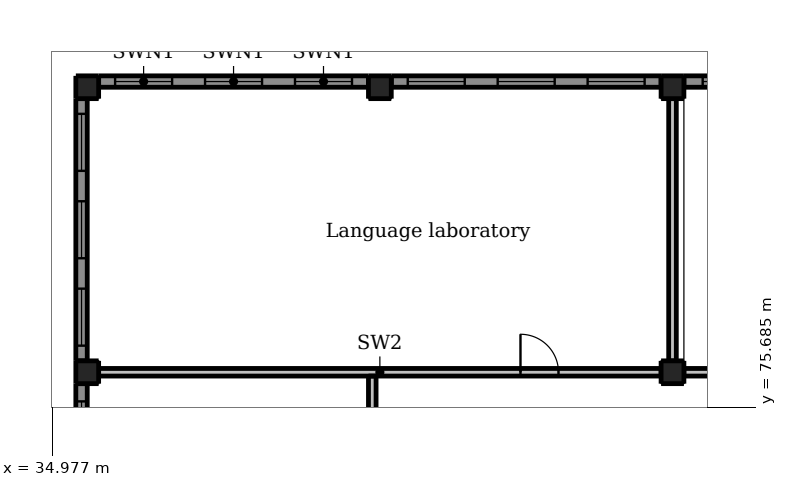
"""IFC4 building model, lengths in metres.
Left out: names, types, materials, properties, quantities, classifications, styles, units other than length and angle.
Written with IfcOpenShell. Run it as: python <this file> out.ifc"""

import sys

from ifc_helpers import new_model, si_unit, direction, frame, frame_2d, origin, origin_2d, place, context, subcontext, project, spatial, rectangle, extrude, element, fill, save


model = new_model("IFC4")
c1 = context("Model", 3, precision=1e-05, world=origin(), true_north=direction((0.0, 1.0)))
c2 = subcontext(c1, "Body", "Model", "MODEL_VIEW")
j1 = project(units=[si_unit("LENGTHUNIT", "METRE"), si_unit("PLANEANGLEUNIT", "RADIAN")], contexts=[c1])
p1 = place(None, origin())
s1 = spatial("IfcSite", under=j1, at=p1, CompositionType="ELEMENT")
p2 = place(p1, origin())
s2 = spatial("IfcBuilding", under=s1, at=p2, CompositionType="ELEMENT")
p3 = place(p2, frame((0.0, 0.0, 19.0)))
s3 = spatial("IfcBuildingStorey", under=s2, at=p3, CompositionType="ELEMENT", Elevation=19.0)
for number, where, z_axis, x_axis in (
    (1, (35.9, 76.6, -0.3), (0.0, 0.0, 1.0), (1.0, 0.0, 0.0)),
    (2, (51.3, 76.6, -0.3), (0.0, 0.0, 1.0), (1.0, 0.0, 0.0)),
    (3, (35.9, 84.1, -0.3), (0.0, 0.0, 1.0), (1.0, 0.0, 0.0)),
    (4, (51.3, 84.1, -0.3), (0.0, 0.0, 1.0), (1.0, 0.0, 0.0)),
    (5, (43.6, 84.1, -0.3), (0.0, 0.0, 1.0), (1.0, 0.0, 0.0)),
):
    element("IfcColumn", number, at=place(p3, frame(where, z_axis=z_axis, x_axis=x_axis)), inside=s3, PredefinedType="COLUMN", context=c2, shape_type="SweptSolid", body=[
        extrude(rectangle(XDim=0.6, YDim=0.6, at=origin_2d()), origin(), (0.0, 0.0, 1.0), 4.35),
    ])
p4 = place(p3, frame((35.75, 69.0, 0.0), z_axis=(0.0, 0.0, 1.0), x_axis=(0.0, 1.0, 0.0)))
e6 = element("IfcWall", 6, at=p4, inside=s3, PredefinedType="SOLIDWALL", context=c2, shape_type="SweptSolid", body=[
    extrude(rectangle(XDim=7.3, YDim=0.3, at=frame_2d((3.65, 0.0))), origin(), (0.0, 0.0, 1.0), 3.15),
])
p5 = place(p4, frame((0.467, 0.0, 0.9)))
e7 = element("IfcOpeningElement", 7, at=p5, cuts=e6, PredefinedType="OPENING", context=c2, shape_type="SweptSolid", body=[
    extrude(rectangle(XDim=1.5, YDim=1.5, at=frame_2d((0.75, 0.75))), frame((0.0, 0.16, 0.0), z_axis=(0.0, -1.0, 0.0), x_axis=(1.0, 0.0, 0.0)), (0.0, 0.0, 1.0), 0.32),
])
p6 = place(p4, frame((2.9, 0.0, 0.9)))
e8 = element("IfcOpeningElement", 8, at=p6, cuts=e6, PredefinedType="OPENING", context=c2, shape_type="SweptSolid", body=[
    extrude(rectangle(XDim=1.5, YDim=1.5, at=frame_2d((0.75, 0.75))), frame((0.0, 0.16, 0.0), z_axis=(0.0, -1.0, 0.0), x_axis=(1.0, 0.0, 0.0)), (0.0, 0.0, 1.0), 0.32),
])
p7 = place(p4, frame((5.333, 0.0, 0.9)))
e9 = element("IfcOpeningElement", 9, at=p7, cuts=e6, PredefinedType="OPENING", context=c2, shape_type="SweptSolid", body=[
    extrude(rectangle(XDim=1.5, YDim=1.5, at=frame_2d((0.75, 0.75))), frame((0.0, 0.16, 0.0), z_axis=(0.0, -1.0, 0.0), x_axis=(1.0, 0.0, 0.0)), (0.0, 0.0, 1.0), 0.32),
])
p8 = place(p3, frame((35.75, 76.9, 0.0), z_axis=(0.0, 0.0, 1.0), x_axis=(0.0, 1.0, 0.0)))
e10 = element("IfcWall", 10, at=p8, inside=s3, PredefinedType="SOLIDWALL", context=c2, shape_type="SweptSolid", body=[
    extrude(rectangle(XDim=6.9, YDim=0.3, at=frame_2d((3.45, 0.0))), origin(), (0.0, 0.0, 1.0), 3.15),
])
p9 = place(p8, frame((0.4, 0.0, 0.9)))
e11 = element("IfcOpeningElement", 11, at=p9, cuts=e10, PredefinedType="OPENING", context=c2, shape_type="SweptSolid", body=[
    extrude(rectangle(XDim=1.5, YDim=1.5, at=frame_2d((0.75, 0.75))), frame((0.0, 0.16, 0.0), z_axis=(0.0, -1.0, 0.0), x_axis=(1.0, 0.0, 0.0)), (0.0, 0.0, 1.0), 0.32),
])
p10 = place(p8, frame((2.7, 0.0, 0.9)))
e12 = element("IfcOpeningElement", 12, at=p10, cuts=e10, PredefinedType="OPENING", context=c2, shape_type="SweptSolid", body=[
    extrude(rectangle(XDim=1.5, YDim=1.5, at=frame_2d((0.75, 0.75))), frame((0.0, 0.16, 0.0), z_axis=(0.0, -1.0, 0.0), x_axis=(1.0, 0.0, 0.0)), (0.0, 0.0, 1.0), 0.32),
])
p11 = place(p8, frame((5.0, 0.0, 0.9)))
e13 = element("IfcOpeningElement", 13, at=p11, cuts=e10, PredefinedType="OPENING", context=c2, shape_type="SweptSolid", body=[
    extrude(rectangle(XDim=1.5, YDim=1.5, at=frame_2d((0.75, 0.75))), frame((0.0, 0.16, 0.0), z_axis=(0.0, -1.0, 0.0), x_axis=(1.0, 0.0, 0.0)), (0.0, 0.0, 1.0), 0.32),
])
p12 = place(p3, frame((36.2, 84.25, 0.0), z_axis=(0.0, 0.0, 1.0), x_axis=(1.0, 0.0, 0.0)))
e14 = element("IfcWall", 14, at=p12, inside=s3, PredefinedType="SOLIDWALL", context=c2, shape_type="SweptSolid", body=[
    extrude(rectangle(XDim=7.1, YDim=0.3, at=frame_2d((3.55, 0.0))), origin(), (0.0, 0.0, 1.0), 3.15),
])
p13 = place(p12, frame((0.433, 0.0, 0.9)))
e15 = element("IfcOpeningElement", 15, at=p13, cuts=e14, PredefinedType="OPENING", context=c2, shape_type="SweptSolid", body=[
    extrude(rectangle(XDim=1.5, YDim=1.5, at=frame_2d((0.75, 0.75))), frame((0.0, 0.16, 0.0), z_axis=(0.0, -1.0, 0.0), x_axis=(1.0, 0.0, 0.0)), (0.0, 0.0, 1.0), 0.32),
])
p14 = place(p12, frame((2.8, 0.0, 0.9)))
e16 = element("IfcOpeningElement", 16, at=p14, cuts=e14, PredefinedType="OPENING", context=c2, shape_type="SweptSolid", body=[
    extrude(rectangle(XDim=1.5, YDim=1.5, at=frame_2d((0.75, 0.75))), frame((0.0, 0.16, 0.0), z_axis=(0.0, -1.0, 0.0), x_axis=(1.0, 0.0, 0.0)), (0.0, 0.0, 1.0), 0.32),
])
p15 = place(p12, frame((5.167, 0.0, 0.9)))
e17 = element("IfcOpeningElement", 17, at=p15, cuts=e14, PredefinedType="OPENING", context=c2, shape_type="SweptSolid", body=[
    extrude(rectangle(XDim=1.5, YDim=1.5, at=frame_2d((0.75, 0.75))), frame((0.0, 0.16, 0.0), z_axis=(0.0, -1.0, 0.0), x_axis=(1.0, 0.0, 0.0)), (0.0, 0.0, 1.0), 0.32),
])
p16 = place(p3, frame((43.9, 84.25, 0.0), z_axis=(0.0, 0.0, 1.0), x_axis=(1.0, 0.0, 0.0)))
e18 = element("IfcWall", 18, at=p16, inside=s3, PredefinedType="SOLIDWALL", context=c2, shape_type="SweptSolid", body=[
    extrude(rectangle(XDim=7.1, YDim=0.3, at=frame_2d((3.55, 0.0))), origin(), (0.0, 0.0, 1.0), 3.15),
])
p17 = place(p16, frame((0.433, 0.0, 0.9)))
e19 = element("IfcOpeningElement", 19, at=p17, cuts=e18, PredefinedType="OPENING", context=c2, shape_type="SweptSolid", body=[
    extrude(rectangle(XDim=1.5, YDim=1.5, at=frame_2d((0.75, 0.75))), frame((0.0, 0.16, 0.0), z_axis=(0.0, -1.0, 0.0), x_axis=(1.0, 0.0, 0.0)), (0.0, 0.0, 1.0), 0.32),
])
p18 = place(p16, frame((2.8, 0.0, 0.9)))
e20 = element("IfcOpeningElement", 20, at=p18, cuts=e18, PredefinedType="OPENING", context=c2, shape_type="SweptSolid", body=[
    extrude(rectangle(XDim=1.5, YDim=1.5, at=frame_2d((0.75, 0.75))), frame((0.0, 0.16, 0.0), z_axis=(0.0, -1.0, 0.0), x_axis=(1.0, 0.0, 0.0)), (0.0, 0.0, 1.0), 0.32),
])
p19 = place(p16, frame((5.167, 0.0, 0.9)))
e21 = element("IfcOpeningElement", 21, at=p19, cuts=e18, PredefinedType="OPENING", context=c2, shape_type="SweptSolid", body=[
    extrude(rectangle(XDim=1.5, YDim=1.5, at=frame_2d((0.75, 0.75))), frame((0.0, 0.16, 0.0), z_axis=(0.0, -1.0, 0.0), x_axis=(1.0, 0.0, 0.0)), (0.0, 0.0, 1.0), 0.32),
])
p20 = place(p3, frame((51.6, 84.25, 0.0), z_axis=(0.0, 0.0, 1.0), x_axis=(1.0, 0.0, 0.0)))
e22 = element("IfcWall", 22, at=p20, inside=s3, PredefinedType="SOLIDWALL", context=c2, shape_type="SweptSolid", body=[
    extrude(rectangle(XDim=7.467, YDim=0.3, at=frame_2d((3.733, 0.0))), origin(), (0.0, 0.0, 1.0), 3.15),
])
p21 = place(p20, frame((0.494, 0.0, 0.9)))
e23 = element("IfcOpeningElement", 23, at=p21, cuts=e22, PredefinedType="OPENING", context=c2, shape_type="SweptSolid", body=[
    extrude(rectangle(XDim=1.5, YDim=1.5, at=frame_2d((0.75, 0.75))), frame((0.0, 0.16, 0.0), z_axis=(0.0, -1.0, 0.0), x_axis=(1.0, 0.0, 0.0)), (0.0, 0.0, 1.0), 0.32),
])
p22 = place(p20, frame((2.983, 0.0, 0.9)))
e24 = element("IfcOpeningElement", 24, at=p22, cuts=e22, PredefinedType="OPENING", context=c2, shape_type="SweptSolid", body=[
    extrude(rectangle(XDim=1.5, YDim=1.5, at=frame_2d((0.75, 0.75))), frame((0.0, 0.16, 0.0), z_axis=(0.0, -1.0, 0.0), x_axis=(1.0, 0.0, 0.0)), (0.0, 0.0, 1.0), 0.32),
])
p23 = place(p20, frame((5.472, 0.0, 0.9)))
e25 = element("IfcOpeningElement", 25, at=p23, cuts=e22, PredefinedType="OPENING", context=c2, shape_type="SweptSolid", body=[
    extrude(rectangle(XDim=1.5, YDim=1.5, at=frame_2d((0.75, 0.75))), frame((0.0, 0.16, 0.0), z_axis=(0.0, -1.0, 0.0), x_axis=(1.0, 0.0, 0.0)), (0.0, 0.0, 1.0), 0.32),
])
p24 = place(p3, frame((43.4, 68.8, 0.0), z_axis=(0.0, 0.0, 1.0), x_axis=(0.0, 1.0, 0.0)))
e26 = element("IfcWall", 26, at=p24, inside=s3, PredefinedType="PARTITIONING", context=c2, shape_type="SweptSolid", body=[
    extrude(rectangle(XDim=7.7, YDim=0.2, at=frame_2d((3.85, 0.0))), origin(), (0.0, 0.0, 1.0), 2.85),
])
p25 = place(p24, frame((3.35, 0.0, 0.0)))
e27 = element("IfcOpeningElement", 27, at=p25, cuts=e26, PredefinedType="OPENING", context=c2, shape_type="SweptSolid", body=[
    extrude(rectangle(XDim=1.0, YDim=2.1, at=frame_2d((0.5, 1.05))), frame((0.0, 0.11, 0.0), z_axis=(0.0, -1.0, 0.0), x_axis=(1.0, 0.0, 0.0)), (0.0, 0.0, 1.0), 0.22),
])
p26 = place(p3, frame((36.2, 76.6, 0.0), z_axis=(0.0, 0.0, 1.0), x_axis=(1.0, 0.0, 0.0)))
e28 = element("IfcWall", 28, at=p26, inside=s3, PredefinedType="PARTITIONING", context=c2, shape_type="SweptSolid", body=[
    extrude(rectangle(XDim=14.8, YDim=0.2, at=frame_2d((7.4, 0.0))), origin(), (0.0, 0.0, 1.0), 2.85),
])
p27 = place(p26, frame((11.1, 0.0, 0.0)))
e29 = element("IfcOpeningElement", 29, at=p27, cuts=e28, PredefinedType="OPENING", context=c2, shape_type="SweptSolid", body=[
    extrude(rectangle(XDim=1.0, YDim=2.1, at=frame_2d((0.5, 1.05))), frame((0.0, 0.11, 0.0), z_axis=(0.0, -1.0, 0.0), x_axis=(1.0, 0.0, 0.0)), (0.0, 0.0, 1.0), 0.22),
])
p28 = place(p3, frame((51.3, 76.9, 0.0), z_axis=(0.0, 0.0, 1.0), x_axis=(0.0, 1.0, 0.0)))
e30 = element("IfcWall", 30, at=p28, inside=s3, PredefinedType="PARTITIONING", context=c2, shape_type="SweptSolid", body=[
    extrude(rectangle(XDim=6.9, YDim=0.2, at=frame_2d((3.45, 0.0))), origin(), (0.0, 0.0, 1.0), 2.85),
])
p29 = place(p3, frame((51.6, 76.6, 0.0), z_axis=(0.0, 0.0, 1.0), x_axis=(1.0, 0.0, 0.0)))
e31 = element("IfcWall", 31, at=p29, inside=s3, PredefinedType="PARTITIONING", context=c2, shape_type="SweptSolid", body=[
    extrude(rectangle(XDim=7.667, YDim=0.2, at=frame_2d((3.833, 0.0))), origin(), (0.0, 0.0, 1.0), 2.85),
])
p30 = place(p29, frame((3.333, 0.0, 0.0)))
e32 = element("IfcOpeningElement", 32, at=p30, cuts=e31, PredefinedType="OPENING", context=c2, shape_type="SweptSolid", body=[
    extrude(rectangle(XDim=1.0, YDim=2.1, at=frame_2d((0.5, 1.05))), frame((0.0, 0.11, 0.0), z_axis=(0.0, -1.0, 0.0), x_axis=(1.0, 0.0, 0.0)), (0.0, 0.0, 1.0), 0.22),
])
p31 = place(p7, origin())
e33 = element("IfcWindow", 33, at=p31, inside=s3, PartitioningType="DOUBLE_PANEL_HORIZONTAL", PredefinedType="WINDOW", context=c2, shape_type="SweptSolid", body=[
    extrude(rectangle(XDim=1.5, YDim=1.5, at=frame_2d((0.75, 0.75))), frame((0.0, 0.03, 0.0), z_axis=(0.0, -1.0, 0.0), x_axis=(1.0, 0.0, 0.0)), (0.0, 0.0, 1.0), 0.06),
])
fill(e9, e33)
p32 = place(p9, origin())
e34 = element("IfcWindow", 34, at=p32, inside=s3, PartitioningType="DOUBLE_PANEL_HORIZONTAL", PredefinedType="WINDOW", context=c2, shape_type="SweptSolid", body=[
    extrude(rectangle(XDim=1.5, YDim=1.5, at=frame_2d((0.75, 0.75))), frame((0.0, 0.03, 0.0), z_axis=(0.0, -1.0, 0.0), x_axis=(1.0, 0.0, 0.0)), (0.0, 0.0, 1.0), 0.06),
])
fill(e11, e34)
p33 = place(p10, origin())
e35 = element("IfcWindow", 35, at=p33, inside=s3, PartitioningType="DOUBLE_PANEL_HORIZONTAL", PredefinedType="WINDOW", context=c2, shape_type="SweptSolid", body=[
    extrude(rectangle(XDim=1.5, YDim=1.5, at=frame_2d((0.75, 0.75))), frame((0.0, 0.03, 0.0), z_axis=(0.0, -1.0, 0.0), x_axis=(1.0, 0.0, 0.0)), (0.0, 0.0, 1.0), 0.06),
])
fill(e12, e35)
p34 = place(p11, origin())
e36 = element("IfcWindow", 36, at=p34, inside=s3, PartitioningType="DOUBLE_PANEL_HORIZONTAL", PredefinedType="WINDOW", context=c2, shape_type="SweptSolid", body=[
    extrude(rectangle(XDim=1.5, YDim=1.5, at=frame_2d((0.75, 0.75))), frame((0.0, 0.03, 0.0), z_axis=(0.0, -1.0, 0.0), x_axis=(1.0, 0.0, 0.0)), (0.0, 0.0, 1.0), 0.06),
])
fill(e13, e36)
p35 = place(p13, origin())
e37 = element("IfcWindow", 37, at=p35, inside=s3, PartitioningType="DOUBLE_PANEL_HORIZONTAL", PredefinedType="WINDOW", context=c2, shape_type="SweptSolid", body=[
    extrude(rectangle(XDim=1.5, YDim=1.5, at=frame_2d((0.75, 0.75))), frame((0.0, 0.03, 0.0), z_axis=(0.0, -1.0, 0.0), x_axis=(1.0, 0.0, 0.0)), (0.0, 0.0, 1.0), 0.06),
])
fill(e15, e37)
p36 = place(p14, origin())
e38 = element("IfcWindow", 38, at=p36, inside=s3, PartitioningType="DOUBLE_PANEL_HORIZONTAL", PredefinedType="WINDOW", context=c2, shape_type="SweptSolid", body=[
    extrude(rectangle(XDim=1.5, YDim=1.5, at=frame_2d((0.75, 0.75))), frame((0.0, 0.03, 0.0), z_axis=(0.0, -1.0, 0.0), x_axis=(1.0, 0.0, 0.0)), (0.0, 0.0, 1.0), 0.06),
])
fill(e16, e38)
p37 = place(p15, origin())
e39 = element("IfcWindow", 39, at=p37, inside=s3, PartitioningType="DOUBLE_PANEL_HORIZONTAL", PredefinedType="WINDOW", context=c2, shape_type="SweptSolid", body=[
    extrude(rectangle(XDim=1.5, YDim=1.5, at=frame_2d((0.75, 0.75))), frame((0.0, 0.03, 0.0), z_axis=(0.0, -1.0, 0.0), x_axis=(1.0, 0.0, 0.0)), (0.0, 0.0, 1.0), 0.06),
])
fill(e17, e39)
p38 = place(p17, origin())
e40 = element("IfcWindow", 40, at=p38, inside=s3, PartitioningType="DOUBLE_PANEL_HORIZONTAL", PredefinedType="WINDOW", context=c2, shape_type="SweptSolid", body=[
    extrude(rectangle(XDim=1.5, YDim=1.5, at=frame_2d((0.75, 0.75))), frame((0.0, 0.03, 0.0), z_axis=(0.0, -1.0, 0.0), x_axis=(1.0, 0.0, 0.0)), (0.0, 0.0, 1.0), 0.06),
])
fill(e19, e40)
p39 = place(p18, origin())
e41 = element("IfcWindow", 41, at=p39, inside=s3, PartitioningType="DOUBLE_PANEL_HORIZONTAL", PredefinedType="WINDOW", context=c2, shape_type="SweptSolid", body=[
    extrude(rectangle(XDim=1.5, YDim=1.5, at=frame_2d((0.75, 0.75))), frame((0.0, 0.03, 0.0), z_axis=(0.0, -1.0, 0.0), x_axis=(1.0, 0.0, 0.0)), (0.0, 0.0, 1.0), 0.06),
])
fill(e20, e41)
p40 = place(p19, origin())
e42 = element("IfcWindow", 42, at=p40, inside=s3, PartitioningType="DOUBLE_PANEL_HORIZONTAL", PredefinedType="WINDOW", context=c2, shape_type="SweptSolid", body=[
    extrude(rectangle(XDim=1.5, YDim=1.5, at=frame_2d((0.75, 0.75))), frame((0.0, 0.03, 0.0), z_axis=(0.0, -1.0, 0.0), x_axis=(1.0, 0.0, 0.0)), (0.0, 0.0, 1.0), 0.06),
])
fill(e21, e42)
p41 = place(p21, origin())
e43 = element("IfcWindow", 43, at=p41, inside=s3, PartitioningType="DOUBLE_PANEL_HORIZONTAL", PredefinedType="WINDOW", context=c2, shape_type="SweptSolid", body=[
    extrude(rectangle(XDim=1.5, YDim=1.5, at=frame_2d((0.75, 0.75))), frame((0.0, 0.03, 0.0), z_axis=(0.0, -1.0, 0.0), x_axis=(1.0, 0.0, 0.0)), (0.0, 0.0, 1.0), 0.06),
])
fill(e23, e43)
p42 = place(p27, origin())
e44 = element("IfcDoor", 44, at=p42, inside=s3, OperationType="SINGLE_SWING_LEFT", PredefinedType="DOOR", context=c2, shape_type="SweptSolid", body=[
    extrude(rectangle(XDim=1.0, YDim=2.1, at=frame_2d((0.5, 1.05))), frame((0.0, 0.025, 0.0), z_axis=(0.0, -1.0, 0.0), x_axis=(1.0, 0.0, 0.0)), (0.0, 0.0, 1.0), 0.05),
])
fill(e29, e44)
save(model, sys.argv[1])
